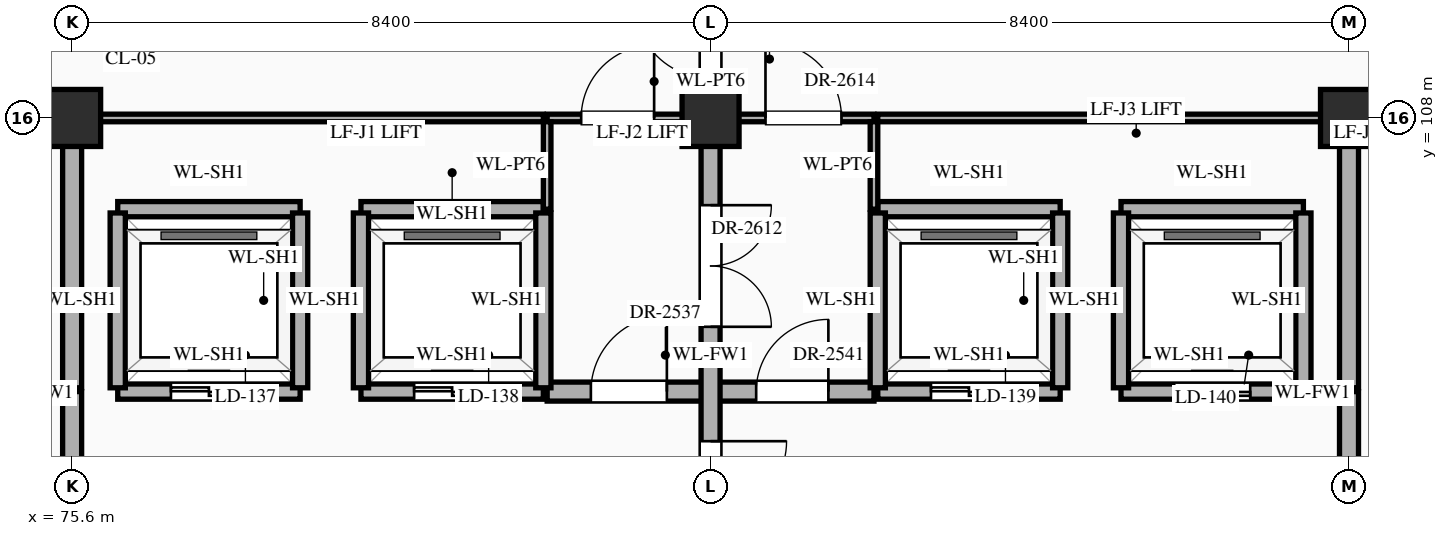
"""IFC4 building model, lengths in metres.
Left out: names, types, materials, properties, quantities, classifications, styles, units other than length and angle.
Written with IfcOpenShell. Run it as: python <this file> out.ifc"""

import sys

from ifc_helpers import new_model, si_unit, direction, frame, frame_2d, origin, origin_2d, place, context, subcontext, project, spatial, rectangle, extrude, element, fill, save


model = new_model("IFC4")
c1 = context("Model", 3, precision=1e-05, world=origin(), true_north=direction((0.0, 1.0)))
c2 = subcontext(c1, "Body", "Model", "MODEL_VIEW")
j1 = project(units=[si_unit("LENGTHUNIT", "METRE"), si_unit("PLANEANGLEUNIT", "RADIAN")], contexts=[c1])
p1 = place(None, origin())
s1 = spatial("IfcSite", under=j1, at=p1, CompositionType="ELEMENT")
p2 = place(p1, origin())
s2 = spatial("IfcBuilding", under=s1, at=p2, CompositionType="ELEMENT")
p3 = place(p2, frame((0.0, 0.0, 35.1)))
s3 = spatial("IfcBuildingStorey", under=s2, at=p3, CompositionType="ELEMENT", Elevation=35.1)
for number, where, z_axis, x_axis in (
    (1, (75.6, 108.0, 0.0), (0.0, 0.0, 1.0), (1.0, 0.0, 0.0)),
    (2, (84.0, 108.0, 0.0), (0.0, 0.0, 1.0), (1.0, 0.0, 0.0)),
    (3, (92.4, 108.0, 0.0), (0.0, 0.0, 1.0), (1.0, 0.0, 0.0)),
):
    element("IfcColumn", number, at=place(p3, frame(where, z_axis=z_axis, x_axis=x_axis)), inside=s3, PredefinedType="COLUMN", context=c2, shape_type="SweptSolid", body=[
        extrude(rectangle(XDim=0.75, YDim=0.75, at=origin_2d()), origin(), (0.0, 0.0, 1.0), 4.2),
    ])
p4 = place(p3, frame((76.2, 104.4, 0.0), z_axis=(0.0, 0.0, 1.0), x_axis=(1.0, 0.0, 0.0)))
e4 = element("IfcWall", 4, at=p4, inside=s3, PredefinedType="STANDARD", context=c2, shape_type="SweptSolid", body=[
    extrude(rectangle(XDim=2.4, YDim=0.2, at=frame_2d((1.2, 0.0))), origin(), (0.0, 0.0, 1.0), 3.95),
])
p5 = place(p4, frame((0.7, 0.0, 0.0)))
e5 = element("IfcOpeningElement", 5, at=p5, cuts=e4, PredefinedType="OPENING", context=c2, shape_type="SweptSolid", body=[
    extrude(rectangle(XDim=1.0, YDim=2.15, at=frame_2d((0.5, 1.075))), frame((0.0, 0.112, 0.0), z_axis=(0.0, -1.0, 0.0), x_axis=(1.0, 0.0, 0.0)), (0.0, 0.0, 1.0), 0.224),
])
p6 = place(p3, frame((79.4, 104.4, 0.0), z_axis=(0.0, 0.0, 1.0), x_axis=(1.0, 0.0, 0.0)))
e6 = element("IfcWall", 6, at=p6, inside=s3, PredefinedType="STANDARD", context=c2, shape_type="SweptSolid", body=[
    extrude(rectangle(XDim=2.4, YDim=0.2, at=frame_2d((1.2, 0.0))), origin(), (0.0, 0.0, 1.0), 3.95),
])
p7 = place(p6, frame((0.7, 0.0, 0.0)))
e7 = element("IfcOpeningElement", 7, at=p7, cuts=e6, PredefinedType="OPENING", context=c2, shape_type="SweptSolid", body=[
    extrude(rectangle(XDim=1.0, YDim=2.15, at=frame_2d((0.5, 1.075))), frame((0.0, 0.112, 0.0), z_axis=(0.0, -1.0, 0.0), x_axis=(1.0, 0.0, 0.0)), (0.0, 0.0, 1.0), 0.224),
])
p8 = place(p3, frame((81.85, 104.4, 0.0), z_axis=(0.0, 0.0, 1.0), x_axis=(1.0, 0.0, 0.0)))
e8 = element("IfcWall", 8, at=p8, inside=s3, PredefinedType="STANDARD", context=c2, shape_type="SweptSolid", body=[
    extrude(rectangle(XDim=4.3, YDim=0.25, at=frame_2d((2.15, 0.0))), origin(), (0.0, 0.0, 1.0), 3.95),
])
p9 = place(p8, frame((0.575, 0.0, 0.0)))
e9 = element("IfcOpeningElement", 9, at=p9, cuts=e8, PredefinedType="OPENING", context=c2, shape_type="SweptSolid", body=[
    extrude(rectangle(XDim=1.0, YDim=2.2, at=frame_2d((0.5, 1.1))), frame((0.0, 0.137, 0.0), z_axis=(0.0, -1.0, 0.0), x_axis=(1.0, 0.0, 0.0)), (0.0, 0.0, 1.0), 0.274),
])
p10 = place(p8, frame((2.75, 0.0, 0.0)))
e10 = element("IfcOpeningElement", 10, at=p10, cuts=e8, PredefinedType="OPENING", context=c2, shape_type="SweptSolid", body=[
    extrude(rectangle(XDim=0.95, YDim=2.15, at=frame_2d((0.475, 1.075))), frame((0.0, 0.137, 0.0), z_axis=(0.0, -1.0, 0.0), x_axis=(1.0, 0.0, 0.0)), (0.0, 0.0, 1.0), 0.274),
])
p11 = place(p3, frame((86.2, 104.4, 0.0), z_axis=(0.0, 0.0, 1.0), x_axis=(1.0, 0.0, 0.0)))
e11 = element("IfcWall", 11, at=p11, inside=s3, PredefinedType="STANDARD", context=c2, shape_type="SweptSolid", body=[
    extrude(rectangle(XDim=2.4, YDim=0.2, at=frame_2d((1.2, 0.0))), origin(), (0.0, 0.0, 1.0), 3.95),
])
p12 = place(p11, frame((0.7, 0.0, 0.0)))
e12 = element("IfcOpeningElement", 12, at=p12, cuts=e11, PredefinedType="OPENING", context=c2, shape_type="SweptSolid", body=[
    extrude(rectangle(XDim=1.0, YDim=2.15, at=frame_2d((0.5, 1.075))), frame((0.0, 0.112, 0.0), z_axis=(0.0, -1.0, 0.0), x_axis=(1.0, 0.0, 0.0)), (0.0, 0.0, 1.0), 0.224),
])
p13 = place(p3, frame((89.4, 104.4, 0.0), z_axis=(0.0, 0.0, 1.0), x_axis=(1.0, 0.0, 0.0)))
e13 = element("IfcWall", 13, at=p13, inside=s3, PredefinedType="STANDARD", context=c2, shape_type="SweptSolid", body=[
    extrude(rectangle(XDim=2.4, YDim=0.2, at=frame_2d((1.2, 0.0))), origin(), (0.0, 0.0, 1.0), 3.95),
])
p14 = place(p13, frame((0.7, 0.0, 0.0)))
e14 = element("IfcOpeningElement", 14, at=p14, cuts=e13, PredefinedType="OPENING", context=c2, shape_type="SweptSolid", body=[
    extrude(rectangle(XDim=1.0, YDim=2.15, at=frame_2d((0.5, 1.075))), frame((0.0, 0.112, 0.0), z_axis=(0.0, -1.0, 0.0), x_axis=(1.0, 0.0, 0.0)), (0.0, 0.0, 1.0), 0.224),
])
for number, where, z_axis, x_axis in (
    (15, (76.2, 106.8, 0.0), (0.0, 0.0, 1.0), (1.0, 0.0, 0.0)),
    (16, (79.4, 106.8, 0.0), (0.0, 0.0, 1.0), (1.0, 0.0, 0.0)),
    (17, (86.2, 106.8, 0.0), (0.0, 0.0, 1.0), (1.0, 0.0, 0.0)),
    (18, (89.4, 106.8, 0.0), (0.0, 0.0, 1.0), (1.0, 0.0, 0.0)),
):
    element("IfcWall", number, at=place(p3, frame(where, z_axis=z_axis, x_axis=x_axis)), inside=s3, PredefinedType="STANDARD", context=c2, shape_type="SweptSolid", body=[
        extrude(rectangle(XDim=2.4, YDim=0.2, at=frame_2d((1.2, 0.0))), origin(), (0.0, 0.0, 1.0), 3.95),
    ])
p15 = place(p3, frame((71.4, 108.0, 0.0), z_axis=(0.0, 0.0, 1.0), x_axis=(1.0, 0.0, 0.0)))
e19 = element("IfcWall", 19, at=p15, inside=s3, PredefinedType="STANDARD", context=c2, shape_type="SweptSolid", body=[
    extrude(rectangle(XDim=4.2, YDim=0.25, at=frame_2d((2.1, 0.0))), origin(), (0.0, 0.0, 1.0), 3.1),
])
p16 = place(p15, frame((1.403, 0.0, 0.0)))
e20 = element("IfcOpeningElement", 20, at=p16, cuts=e19, PredefinedType="OPENING", context=c2, shape_type="SweptSolid", body=[
    extrude(rectangle(XDim=1.1, YDim=2.2, at=frame_2d((0.55, 1.1))), frame((0.0, 0.137, 0.0), z_axis=(0.0, -1.0, 0.0), x_axis=(1.0, 0.0, 0.0)), (0.0, 0.0, 1.0), 0.274),
])
p17 = place(p3, frame((75.65, 108.0, 0.0), z_axis=(0.0, 0.0, 1.0), x_axis=(1.0, 0.0, 0.0)))
e21 = element("IfcWall", 21, at=p17, inside=s3, PredefinedType="STANDARD", context=c2, shape_type="SweptSolid", body=[
    extrude(rectangle(XDim=6.15, YDim=0.1, at=frame_2d((3.075, 0.0))), origin(), (0.0, 0.0, 1.0), 3.1),
])
p18 = place(p3, frame((81.85, 108.0, 0.0), z_axis=(0.0, 0.0, 1.0), x_axis=(1.0, 0.0, 0.0)))
e22 = element("IfcWall", 22, at=p18, inside=s3, PredefinedType="STANDARD", context=c2, shape_type="SweptSolid", body=[
    extrude(rectangle(XDim=4.3, YDim=0.1, at=frame_2d((2.15, 0.0))), origin(), (0.0, 0.0, 1.0), 3.1),
])
p19 = place(p18, frame((0.448, 0.0, 0.0)))
e23 = element("IfcOpeningElement", 23, at=p19, cuts=e22, PredefinedType="OPENING", context=c2, shape_type="SweptSolid", body=[
    extrude(rectangle(XDim=0.96, YDim=2.2, at=frame_2d((0.48, 1.1))), frame((0.0, 0.062, 0.0), z_axis=(0.0, -1.0, 0.0), x_axis=(1.0, 0.0, 0.0)), (0.0, 0.0, 1.0), 0.124),
])
p20 = place(p18, frame((2.873, 0.0, 0.0)))
e24 = element("IfcOpeningElement", 24, at=p20, cuts=e22, PredefinedType="OPENING", context=c2, shape_type="SweptSolid", body=[
    extrude(rectangle(XDim=1.0, YDim=2.25, at=frame_2d((0.5, 1.125))), frame((0.0, 0.062, 0.0), z_axis=(0.0, -1.0, 0.0), x_axis=(1.0, 0.0, 0.0)), (0.0, 0.0, 1.0), 0.124),
])
p21 = place(p3, frame((86.2, 108.0, 0.0), z_axis=(0.0, 0.0, 1.0), x_axis=(1.0, 0.0, 0.0)))
e25 = element("IfcWall", 25, at=p21, inside=s3, PredefinedType="STANDARD", context=c2, shape_type="SweptSolid", body=[
    extrude(rectangle(XDim=6.15, YDim=0.1, at=frame_2d((3.075, 0.0))), origin(), (0.0, 0.0, 1.0), 3.1),
])
p22 = place(p3, frame((92.4, 108.0, 0.0), z_axis=(0.0, 0.0, 1.0), x_axis=(1.0, 0.0, 0.0)))
e26 = element("IfcWall", 26, at=p22, inside=s3, PredefinedType="STANDARD", context=c2, shape_type="SweptSolid", body=[
    extrude(rectangle(XDim=4.2, YDim=0.25, at=frame_2d((2.1, 0.0))), origin(), (0.0, 0.0, 1.0), 3.1),
])
p23 = place(p22, frame((1.772, 0.0, 0.0)))
e27 = element("IfcOpeningElement", 27, at=p23, cuts=e26, PredefinedType="OPENING", context=c2, shape_type="SweptSolid", body=[
    extrude(rectangle(XDim=0.95, YDim=2.15, at=frame_2d((0.475, 1.075))), frame((0.0, 0.137, 0.0), z_axis=(0.0, -1.0, 0.0), x_axis=(1.0, 0.0, 0.0)), (0.0, 0.0, 1.0), 0.274),
])
p24 = place(p3, frame((75.6, 100.8, 0.0), z_axis=(0.0, 0.0, 1.0), x_axis=(0.0, 1.0, 0.0)))
e28 = element("IfcWall", 28, at=p24, inside=s3, PredefinedType="STANDARD", context=c2, shape_type="SweptSolid", body=[
    extrude(rectangle(XDim=3.6, YDim=0.25, at=frame_2d((1.8, 0.0))), origin(), (0.0, 0.0, 1.0), 3.2),
])
p25 = place(p24, frame((0.847, 0.0, 0.0)))
e29 = element("IfcOpeningElement", 29, at=p25, cuts=e28, PredefinedType="OPENING", context=c2, shape_type="SweptSolid", body=[
    extrude(rectangle(XDim=1.0, YDim=2.2, at=frame_2d((0.5, 1.1))), frame((0.0, 0.137, 0.0), z_axis=(0.0, -1.0, 0.0), x_axis=(1.0, 0.0, 0.0)), (0.0, 0.0, 1.0), 0.274),
])
p26 = place(p3, frame((75.6, 104.45, 0.0), z_axis=(0.0, 0.0, 1.0), x_axis=(0.0, 1.0, 0.0)))
e30 = element("IfcWall", 30, at=p26, inside=s3, PredefinedType="STANDARD", context=c2, shape_type="SweptSolid", body=[
    extrude(rectangle(XDim=3.5, YDim=0.25, at=frame_2d((1.75, 0.0))), origin(), (0.0, 0.0, 1.0), 3.2),
])
for number, where, z_axis, x_axis in (
    (31, (76.2, 104.45, 0.0), (0.0, 0.0, 1.0), (0.0, 1.0, 0.0)),
    (32, (78.6, 104.45, 0.0), (0.0, 0.0, 1.0), (0.0, 1.0, 0.0)),
    (33, (79.4, 104.45, 0.0), (0.0, 0.0, 1.0), (0.0, 1.0, 0.0)),
    (34, (81.8, 104.45, 0.0), (0.0, 0.0, 1.0), (0.0, 1.0, 0.0)),
):
    element("IfcWall", number, at=place(p3, frame(where, z_axis=z_axis, x_axis=x_axis)), inside=s3, PredefinedType="STANDARD", context=c2, shape_type="SweptSolid", body=[
        extrude(rectangle(XDim=2.3, YDim=0.2, at=frame_2d((1.15, 0.0))), origin(), (0.0, 0.0, 1.0), 3.95),
    ])
p27 = place(p3, frame((81.85, 106.8, 0.0), z_axis=(0.0, 0.0, 1.0), x_axis=(0.0, 1.0, 0.0)))
e35 = element("IfcWall", 35, at=p27, inside=s3, PredefinedType="STANDARD", context=c2, shape_type="SweptSolid", body=[
    extrude(rectangle(XDim=1.15, YDim=0.1, at=frame_2d((0.575, 0.0))), origin(), (0.0, 0.0, 1.0), 3.95),
])
p28 = place(p3, frame((84.0, 84.65, 0.0), z_axis=(0.0, 0.0, 1.0), x_axis=(0.0, 1.0, 0.0)))
e36 = element("IfcWall", 36, at=p28, inside=s3, PredefinedType="STANDARD", context=c2, shape_type="SweptSolid", body=[
    extrude(rectangle(XDim=30.51, YDim=0.25, at=frame_2d((15.255, 0.0))), origin(), (0.0, 0.0, 1.0), 3.2),
])
p29 = place(p28, frame((17.097, 0.0, 0.0)))
e37 = element("IfcOpeningElement", 37, at=p29, cuts=e36, PredefinedType="OPENING", context=c2, shape_type="SweptSolid", body=[
    extrude(rectangle(XDim=2.0, YDim=2.4, at=frame_2d((1.0, 1.2))), frame((0.0, 0.137, 0.0), z_axis=(0.0, -1.0, 0.0), x_axis=(1.0, 0.0, 0.0)), (0.0, 0.0, 1.0), 0.274),
])
p30 = place(p28, frame((7.127, 0.0, 0.0)))
e38 = element("IfcOpeningElement", 38, at=p30, cuts=e36, PredefinedType="OPENING", context=c2, shape_type="SweptSolid", body=[
    extrude(rectangle(XDim=0.95, YDim=2.15, at=frame_2d((0.475, 1.075))), frame((0.0, 0.137, 0.0), z_axis=(0.0, -1.0, 0.0), x_axis=(1.0, 0.0, 0.0)), (0.0, 0.0, 1.0), 0.274),
])
p31 = place(p28, frame((9.823, 0.0, 0.0)))
e39 = element("IfcOpeningElement", 39, at=p31, cuts=e36, PredefinedType="OPENING", context=c2, shape_type="SweptSolid", body=[
    extrude(rectangle(XDim=0.95, YDim=2.15, at=frame_2d((0.475, 1.075))), frame((0.0, 0.137, 0.0), z_axis=(0.0, -1.0, 0.0), x_axis=(1.0, 0.0, 0.0)), (0.0, 0.0, 1.0), 0.274),
])
p32 = place(p28, frame((20.603, 0.0, 0.0)))
e40 = element("IfcOpeningElement", 40, at=p32, cuts=e36, PredefinedType="OPENING", context=c2, shape_type="SweptSolid", body=[
    extrude(rectangle(XDim=1.6, YDim=2.3, at=frame_2d((0.8, 1.15))), frame((0.0, 0.137, 0.0), z_axis=(0.0, -1.0, 0.0), x_axis=(1.0, 0.0, 0.0)), (0.0, 0.0, 1.0), 0.274),
])
p33 = place(p28, frame((23.873, 0.0, 0.0)))
e41 = element("IfcOpeningElement", 41, at=p33, cuts=e36, PredefinedType="OPENING", context=c2, shape_type="SweptSolid", body=[
    extrude(rectangle(XDim=1.0, YDim=2.2, at=frame_2d((0.5, 1.1))), frame((0.0, 0.137, 0.0), z_axis=(0.0, -1.0, 0.0), x_axis=(1.0, 0.0, 0.0)), (0.0, 0.0, 1.0), 0.274),
])
p34 = place(p28, frame((0.228, 0.0, 0.0)))
e42 = element("IfcOpeningElement", 42, at=p34, cuts=e36, PredefinedType="OPENING", context=c2, shape_type="SweptSolid", body=[
    extrude(rectangle(XDim=1.0, YDim=2.2, at=frame_2d((0.5, 1.1))), frame((0.0, 0.137, 0.0), z_axis=(0.0, -1.0, 0.0), x_axis=(1.0, 0.0, 0.0)), (0.0, 0.0, 1.0), 0.274),
])
p35 = place(p3, frame((86.15, 106.8, 0.0), z_axis=(0.0, 0.0, 1.0), x_axis=(0.0, 1.0, 0.0)))
e43 = element("IfcWall", 43, at=p35, inside=s3, PredefinedType="STANDARD", context=c2, shape_type="SweptSolid", body=[
    extrude(rectangle(XDim=1.15, YDim=0.1, at=frame_2d((0.575, 0.0))), origin(), (0.0, 0.0, 1.0), 3.95),
])
for number, where, z_axis, x_axis in (
    (44, (86.2, 104.45, 0.0), (0.0, 0.0, 1.0), (0.0, 1.0, 0.0)),
    (45, (88.6, 104.45, 0.0), (0.0, 0.0, 1.0), (0.0, 1.0, 0.0)),
    (46, (89.4, 104.45, 0.0), (0.0, 0.0, 1.0), (0.0, 1.0, 0.0)),
    (47, (91.8, 104.45, 0.0), (0.0, 0.0, 1.0), (0.0, 1.0, 0.0)),
):
    element("IfcWall", number, at=place(p3, frame(where, z_axis=z_axis, x_axis=x_axis)), inside=s3, PredefinedType="STANDARD", context=c2, shape_type="SweptSolid", body=[
        extrude(rectangle(XDim=2.3, YDim=0.2, at=frame_2d((1.15, 0.0))), origin(), (0.0, 0.0, 1.0), 3.95),
    ])
p36 = place(p3, frame((92.4, 100.8, 0.0), z_axis=(0.0, 0.0, 1.0), x_axis=(0.0, 1.0, 0.0)))
e48 = element("IfcWall", 48, at=p36, inside=s3, PredefinedType="STANDARD", context=c2, shape_type="SweptSolid", body=[
    extrude(rectangle(XDim=3.6, YDim=0.25, at=frame_2d((1.8, 0.0))), origin(), (0.0, 0.0, 1.0), 3.2),
])
p37 = place(p36, frame((0.798, 0.0, 0.0)))
e49 = element("IfcOpeningElement", 49, at=p37, cuts=e48, PredefinedType="OPENING", context=c2, shape_type="SweptSolid", body=[
    extrude(rectangle(XDim=1.1, YDim=2.2, at=frame_2d((0.55, 1.1))), frame((0.0, 0.137, 0.0), z_axis=(0.0, -1.0, 0.0), x_axis=(1.0, 0.0, 0.0)), (0.0, 0.0, 1.0), 0.274),
])
p38 = place(p3, frame((92.4, 104.45, 0.0), z_axis=(0.0, 0.0, 1.0), x_axis=(0.0, 1.0, 0.0)))
e50 = element("IfcWall", 50, at=p38, inside=s3, PredefinedType="STANDARD", context=c2, shape_type="SweptSolid", body=[
    extrude(rectangle(XDim=3.5, YDim=0.25, at=frame_2d((1.75, 0.0))), origin(), (0.0, 0.0, 1.0), 3.2),
])
p39 = place(p5, origin())
e51 = element("IfcDoor", 51, at=p39, inside=s3, OperationType="DOUBLE_DOOR_SLIDING", PredefinedType="DOOR", context=c2, shape_type="SweptSolid", body=[
    extrude(rectangle(XDim=1.0, YDim=2.15, at=frame_2d((0.5, 1.075))), frame((0.0, 0.025, 0.0), z_axis=(0.0, -1.0, 0.0), x_axis=(1.0, 0.0, 0.0)), (0.0, 0.0, 1.0), 0.05),
])
fill(e5, e51)
p40 = place(p7, origin())
e52 = element("IfcDoor", 52, at=p40, inside=s3, OperationType="DOUBLE_DOOR_SLIDING", PredefinedType="DOOR", context=c2, shape_type="SweptSolid", body=[
    extrude(rectangle(XDim=1.0, YDim=2.15, at=frame_2d((0.5, 1.075))), frame((0.0, 0.025, 0.0), z_axis=(0.0, -1.0, 0.0), x_axis=(1.0, 0.0, 0.0)), (0.0, 0.0, 1.0), 0.05),
])
fill(e7, e52)
p41 = place(p12, origin())
e53 = element("IfcDoor", 53, at=p41, inside=s3, OperationType="DOUBLE_DOOR_SLIDING", PredefinedType="DOOR", context=c2, shape_type="SweptSolid", body=[
    extrude(rectangle(XDim=1.0, YDim=2.15, at=frame_2d((0.5, 1.075))), frame((0.0, 0.025, 0.0), z_axis=(0.0, -1.0, 0.0), x_axis=(1.0, 0.0, 0.0)), (0.0, 0.0, 1.0), 0.05),
])
fill(e12, e53)
p42 = place(p14, origin())
e54 = element("IfcDoor", 54, at=p42, inside=s3, OperationType="DOUBLE_DOOR_SLIDING", PredefinedType="DOOR", context=c2, shape_type="SweptSolid", body=[
    extrude(rectangle(XDim=1.0, YDim=2.15, at=frame_2d((0.5, 1.075))), frame((0.0, 0.025, 0.0), z_axis=(0.0, -1.0, 0.0), x_axis=(1.0, 0.0, 0.0)), (0.0, 0.0, 1.0), 0.05),
])
fill(e14, e54)
p43 = place(p29, frame((2.0, 0.0, 0.0), z_axis=(0.0, 0.0, 1.0), x_axis=(-1.0, 0.0, 0.0)))
e55 = element("IfcDoor", 55, at=p43, inside=s3, OperationType="DOUBLE_DOOR_SINGLE_SWING", PredefinedType="DOOR", context=c2, shape_type="SweptSolid", body=[
    extrude(rectangle(XDim=2.0, YDim=2.4, at=frame_2d((1.0, 1.2))), frame((0.0, 0.025, 0.0), z_axis=(0.0, -1.0, 0.0), x_axis=(1.0, 0.0, 0.0)), (0.0, 0.0, 1.0), 0.05),
])
fill(e37, e55)
p44 = place(p9, origin())
e56 = element("IfcDoor", 56, at=p44, inside=s3, OperationType="SINGLE_SWING_RIGHT", PredefinedType="DOOR", context=c2, shape_type="SweptSolid", body=[
    extrude(rectangle(XDim=1.0, YDim=2.2, at=frame_2d((0.5, 1.1))), frame((0.0, 0.025, 0.0), z_axis=(0.0, -1.0, 0.0), x_axis=(1.0, 0.0, 0.0)), (0.0, 0.0, 1.0), 0.05),
])
fill(e9, e56)
p45 = place(p10, origin())
e57 = element("IfcDoor", 57, at=p45, inside=s3, OperationType="SINGLE_SWING_RIGHT", PredefinedType="DOOR", context=c2, shape_type="SweptSolid", body=[
    extrude(rectangle(XDim=0.95, YDim=2.15, at=frame_2d((0.475, 1.075))), frame((0.0, 0.025, 0.0), z_axis=(0.0, -1.0, 0.0), x_axis=(1.0, 0.0, 0.0)), (0.0, 0.0, 1.0), 0.05),
])
fill(e10, e57)
p46 = place(p32, frame((1.6, 0.0, 0.0), z_axis=(0.0, 0.0, 1.0), x_axis=(-1.0, 0.0, 0.0)))
e58 = element("IfcDoor", 58, at=p46, inside=s3, OperationType="DOUBLE_DOOR_SINGLE_SWING", PredefinedType="DOOR", context=c2, shape_type="SweptSolid", body=[
    extrude(rectangle(XDim=1.6, YDim=2.3, at=frame_2d((0.8, 1.15))), frame((0.0, 0.025, 0.0), z_axis=(0.0, -1.0, 0.0), x_axis=(1.0, 0.0, 0.0)), (0.0, 0.0, 1.0), 0.05),
])
fill(e40, e58)
p47 = place(p19, origin())
e59 = element("IfcDoor", 59, at=p47, inside=s3, OperationType="SINGLE_SWING_RIGHT", PredefinedType="DOOR", context=c2, shape_type="SweptSolid", body=[
    extrude(rectangle(XDim=0.96, YDim=2.2, at=frame_2d((0.48, 1.1))), frame((0.0, 0.025, 0.0), z_axis=(0.0, -1.0, 0.0), x_axis=(1.0, 0.0, 0.0)), (0.0, 0.0, 1.0), 0.05),
])
fill(e23, e59)
p48 = place(p20, origin())
e60 = element("IfcDoor", 60, at=p48, inside=s3, OperationType="SINGLE_SWING_LEFT", PredefinedType="DOOR", context=c2, shape_type="SweptSolid", body=[
    extrude(rectangle(XDim=1.0, YDim=2.25, at=frame_2d((0.5, 1.125))), frame((0.0, 0.025, 0.0), z_axis=(0.0, -1.0, 0.0), x_axis=(1.0, 0.0, 0.0)), (0.0, 0.0, 1.0), 0.05),
])
fill(e24, e60)
p49 = place(p33, origin())
e61 = element("IfcDoor", 61, at=p49, inside=s3, OperationType="SINGLE_SWING_RIGHT", PredefinedType="DOOR", context=c2, shape_type="SweptSolid", body=[
    extrude(rectangle(XDim=1.0, YDim=2.2, at=frame_2d((0.5, 1.1))), frame((0.0, 0.025, 0.0), z_axis=(0.0, -1.0, 0.0), x_axis=(1.0, 0.0, 0.0)), (0.0, 0.0, 1.0), 0.05),
])
fill(e41, e61)
save(model, sys.argv[1])
